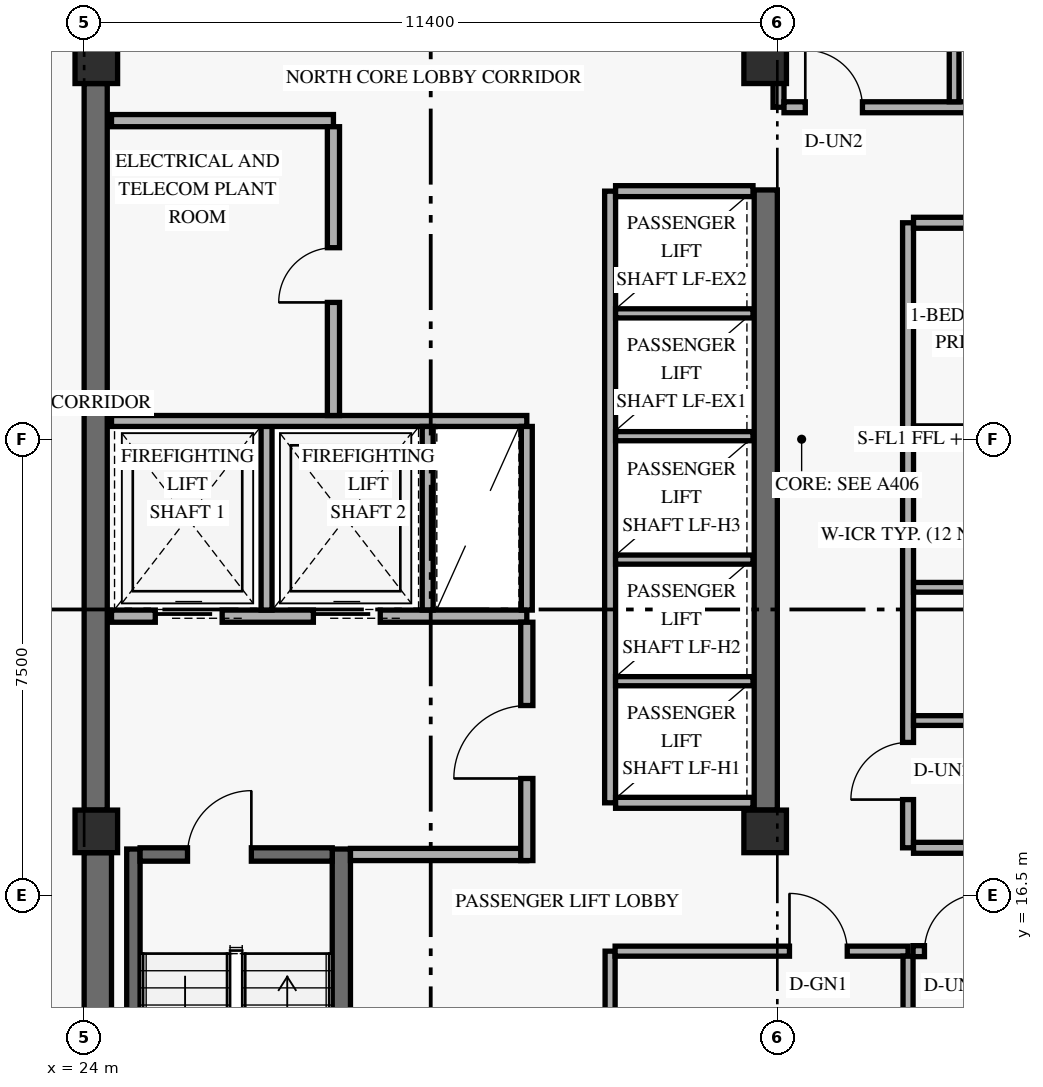
"""IFC4 building model, lengths in metres.
Left out: names, types, materials, properties, quantities, classifications, styles, units other than length and angle.
Written with IfcOpenShell. Run it as: python <this file> out.ifc"""

import sys

from ifc_helpers import new_model, si_unit, direction, frame, frame_2d, origin, origin_2d, place, context, subcontext, project, spatial, rectangle, extrude, element, fill, save


model = new_model("IFC4")
c1 = context("Model", 3, precision=1e-05, world=origin(), true_north=direction((0.0, 1.0)))
c2 = subcontext(c1, "Body", "Model", "MODEL_VIEW")
j1 = project(units=[si_unit("LENGTHUNIT", "METRE"), si_unit("PLANEANGLEUNIT", "RADIAN")], contexts=[c1])
p1 = place(None, origin())
s1 = spatial("IfcSite", under=j1, at=p1, CompositionType="ELEMENT")
p2 = place(p1, origin())
s2 = spatial("IfcBuilding", under=s1, at=p2, CompositionType="ELEMENT")
p3 = place(p2, frame((0.0, 0.0, 155.4)))
s3 = spatial("IfcBuildingStorey", under=s2, at=p3, CompositionType="ELEMENT", Elevation=155.4)
p4 = place(p3, frame((24.225, 9.6, 0.0), z_axis=(0.0, 0.0, 1.0), x_axis=(0.0, 1.0, 0.0)))
e1 = element("IfcWall", 1, at=p4, inside=s3, PredefinedType="SHEAR", context=c2, shape_type="SweptSolid", body=[
    extrude(rectangle(XDim=7.6, YDim=0.45, at=frame_2d((3.8, 0.0))), origin(), (0.0, 0.0, 1.0), 2.748),
])
p5 = place(p3, frame((24.19, 17.9, 0.0), z_axis=(0.0, 0.0, 1.0), x_axis=(0.0, 1.0, 0.0)))
e2 = element("IfcWall", 2, at=p5, inside=s3, PredefinedType="SHEAR", context=c2, shape_type="SweptSolid", body=[
    extrude(rectangle(XDim=11.95, YDim=0.38, at=frame_2d((5.975, 0.0))), origin(), (0.0, 0.0, 1.0), 2.748),
])
p6 = place(p3, frame((35.21, 17.9, 0.0), z_axis=(0.0, 0.0, 1.0), x_axis=(0.0, 1.0, 0.0)))
e3 = element("IfcWall", 3, at=p6, inside=s3, PredefinedType="SHEAR", context=c2, shape_type="SweptSolid", body=[
    extrude(rectangle(XDim=10.2, YDim=0.38, at=frame_2d((5.1, 0.0))), origin(), (0.0, 0.0, 1.0), 2.748),
])
p7 = place(p3, frame((24.81, 9.5, 0.0), z_axis=(0.0, 0.0, 1.0), x_axis=(0.0, 1.0, 0.0)))
e4 = element("IfcWall", 4, at=p7, inside=s3, PredefinedType="SHEAR", context=c2, shape_type="SweptSolid", body=[
    extrude(rectangle(XDim=7.76, YDim=0.22, at=frame_2d((3.88, 0.0))), origin(), (0.0, 0.0, 1.0), 3.36),
])
p8 = place(p3, frame((28.23, 9.5, 0.0), z_axis=(0.0, 0.0, 1.0), x_axis=(0.0, 1.0, 0.0)))
e5 = element("IfcWall", 5, at=p8, inside=s3, PredefinedType="SHEAR", context=c2, shape_type="SweptSolid", body=[
    extrude(rectangle(XDim=7.76, YDim=0.3, at=frame_2d((3.88, 0.0))), origin(), (0.0, 0.0, 1.0), 3.36),
])
p9 = place(p3, frame((24.92, 17.17, 0.0), z_axis=(0.0, 0.0, 1.0), x_axis=(1.0, 0.0, 0.0)))
e6 = element("IfcWall", 6, at=p9, inside=s3, PredefinedType="SHEAR", context=c2, shape_type="SweptSolid", body=[
    extrude(rectangle(XDim=3.16, YDim=0.22, at=frame_2d((1.58, 0.0))), origin(), (0.0, 0.0, 1.0), 3.36),
])
p10 = place(p9, frame((0.78, 0.0, 0.0)))
e7 = element("IfcOpeningElement", 7, at=p10, cuts=e6, PredefinedType="OPENING", context=c2, shape_type="SweptSolid", body=[
    extrude(rectangle(XDim=1.05, YDim=2.15, at=frame_2d((0.525, 1.075))), frame((0.0, 0.12, 0.0), z_axis=(0.0, -1.0, 0.0), x_axis=(1.0, 0.0, 0.0)), (0.0, 0.0, 1.0), 0.24),
])
for number, where, z_axis, x_axis in (
    (8, (24.2, 17.55, 0.0), (0.0, 0.0, 1.0), (1.0, 0.0, 0.0)),
    (9, (24.2, 30.2, 0.0), (0.0, 0.0, 1.0), (1.0, 0.0, 0.0)),
    (10, (35.2, 17.55, 0.0), (0.0, 0.0, 1.0), (1.0, 0.0, 0.0)),
    (11, (35.2, 30.2, 0.0), (0.0, 0.0, 1.0), (1.0, 0.0, 0.0)),
):
    element("IfcColumn", number, at=place(p3, frame(where, z_axis=z_axis, x_axis=x_axis)), inside=s3, PredefinedType="COLUMN", context=c2, shape_type="SweptSolid", body=[
        extrude(rectangle(XDim=0.7, YDim=0.7, at=origin_2d()), origin(), (0.0, 0.0, 1.0), 3.6),
    ])
p11 = place(p3, frame((24.45, 21.09, 0.0), z_axis=(0.0, 0.0, 1.0), x_axis=(1.0, 0.0, 0.0)))
e12 = element("IfcWall", 12, at=p11, inside=s3, PredefinedType="STANDARD", context=c2, shape_type="SweptSolid", body=[
    extrude(rectangle(XDim=6.83, YDim=0.2, at=frame_2d((3.415, 0.0))), origin(), (0.0, 0.0, 1.0), 3.36),
])
p12 = place(p11, frame((0.72, 0.0, 0.0)))
e13 = element("IfcOpeningElement", 13, at=p12, cuts=e12, PredefinedType="OPENING", context=c2, shape_type="SweptSolid", body=[
    extrude(rectangle(XDim=1.1, YDim=2.2, at=frame_2d((0.55, 1.1))), frame((0.0, 0.11, 0.0), z_axis=(0.0, -1.0, 0.0), x_axis=(1.0, 0.0, 0.0)), (0.0, 0.0, 1.0), 0.22),
])
p13 = place(p11, frame((3.32, 0.0, 0.0)))
e14 = element("IfcOpeningElement", 14, at=p13, cuts=e12, PredefinedType="OPENING", context=c2, shape_type="SweptSolid", body=[
    extrude(rectangle(XDim=1.1, YDim=2.2, at=frame_2d((0.55, 1.1))), frame((0.0, 0.11, 0.0), z_axis=(0.0, -1.0, 0.0), x_axis=(1.0, 0.0, 0.0)), (0.0, 0.0, 1.0), 0.22),
])
p14 = place(p3, frame((28.38, 17.17, 0.0), z_axis=(0.0, 0.0, 1.0), x_axis=(1.0, 0.0, 0.0)))
e15 = element("IfcWall", 15, at=p14, inside=s3, PredefinedType="STANDARD", context=c2, shape_type="SweptSolid", body=[
    extrude(rectangle(XDim=2.9, YDim=0.2, at=frame_2d((1.45, 0.0))), origin(), (0.0, 0.0, 1.0), 3.36),
])
p15 = place(p3, frame((31.28, 17.07, 0.0), z_axis=(0.0, 0.0, 1.0), x_axis=(0.0, 1.0, 0.0)))
e16 = element("IfcWall", 16, at=p15, inside=s3, PredefinedType="STANDARD", context=c2, shape_type="SweptSolid", body=[
    extrude(rectangle(XDim=3.92, YDim=0.2, at=frame_2d((1.96, 0.0))), origin(), (0.0, 0.0, 1.0), 2.73),
])
p16 = place(p15, frame((1.35, 0.0, 0.0)))
e17 = element("IfcOpeningElement", 17, at=p16, cuts=e16, PredefinedType="OPENING", context=c2, shape_type="SweptSolid", body=[
    extrude(rectangle(XDim=1.2, YDim=2.15, at=frame_2d((0.6, 1.075))), frame((0.0, 0.11, 0.0), z_axis=(0.0, -1.0, 0.0), x_axis=(1.0, 0.0, 0.0)), (0.0, 0.0, 1.0), 0.22),
])
p17 = place(p3, frame((27.0, 21.19, 0.0), z_axis=(0.0, 0.0, 1.0), x_axis=(0.0, 1.0, 0.0)))
e18 = element("IfcWall", 18, at=p17, inside=s3, PredefinedType="STANDARD", context=c2, shape_type="SweptSolid", body=[
    extrude(rectangle(XDim=3.11, YDim=0.18, at=frame_2d((1.555, 0.0))), origin(), (0.0, 0.0, 1.0), 3.36),
])
p18 = place(p3, frame((24.45, 24.3, 0.0), z_axis=(0.0, 0.0, 1.0), x_axis=(1.0, 0.0, 0.0)))
e19 = element("IfcWall", 19, at=p18, inside=s3, PredefinedType="STANDARD", context=c2, shape_type="SweptSolid", body=[
    extrude(rectangle(XDim=6.83, YDim=0.18, at=frame_2d((3.415, 0.0))), origin(), (0.0, 0.0, 1.0), 3.36),
])
for number, where, z_axis, x_axis in (
    (20, (29.65, 21.19, 0.0), (0.0, 0.0, 1.0), (0.0, 1.0, 0.0)),
    (21, (31.28, 21.19, 0.0), (0.0, 0.0, 1.0), (0.0, 1.0, 0.0)),
):
    element("IfcWall", number, at=place(p3, frame(where, z_axis=z_axis, x_axis=x_axis)), inside=s3, PredefinedType="STANDARD", context=c2, shape_type="SweptSolid", body=[
        extrude(rectangle(XDim=3.02, YDim=0.18, at=frame_2d((1.51, 0.0))), origin(), (0.0, 0.0, 1.0), 3.36),
    ])
p19 = place(p3, frame((24.45, 29.24, 0.0), z_axis=(0.0, 0.0, 1.0), x_axis=(1.0, 0.0, 0.0)))
e22 = element("IfcWall", 22, at=p19, inside=s3, PredefinedType="STANDARD", context=c2, shape_type="SweptSolid", body=[
    extrude(rectangle(XDim=3.65, YDim=0.2, at=frame_2d((1.825, 0.0))), origin(), (0.0, 0.0, 1.0), 3.36),
])
p20 = place(p3, frame((28.1, 24.39, 0.0), z_axis=(0.0, 0.0, 1.0), x_axis=(0.0, 1.0, 0.0)))
e23 = element("IfcWall", 23, at=p20, inside=s3, PredefinedType="STANDARD", context=c2, shape_type="SweptSolid", body=[
    extrude(rectangle(XDim=4.75, YDim=0.2, at=frame_2d((2.375, 0.0))), origin(), (0.0, 0.0, 1.0), 3.36),
])
p21 = place(p20, frame((1.86, 0.0, 0.0)))
e24 = element("IfcOpeningElement", 24, at=p21, cuts=e23, PredefinedType="OPENING", context=c2, shape_type="SweptSolid", body=[
    extrude(rectangle(XDim=0.9, YDim=2.1, at=frame_2d((0.45, 1.05))), frame((0.0, 0.11, 0.0), z_axis=(0.0, -1.0, 0.0), x_axis=(1.0, 0.0, 0.0)), (0.0, 0.0, 1.0), 0.22),
])
p22 = place(p3, frame((32.65, 18.02, 0.0), z_axis=(0.0, 0.0, 1.0), x_axis=(0.0, 1.0, 0.0)))
e25 = element("IfcWall", 25, at=p22, inside=s3, PredefinedType="STANDARD", context=c2, shape_type="SweptSolid", body=[
    extrude(rectangle(XDim=10.06, YDim=0.18, at=frame_2d((5.03, 0.0))), origin(), (0.0, 0.0, 1.0), 3.36),
])
for number, where, z_axis, x_axis in (
    (26, (32.74, 18.02, 0.0), (0.0, 0.0, 1.0), (1.0, 0.0, 0.0)),
    (27, (32.74, 28.08, 0.0), (0.0, 0.0, 1.0), (1.0, 0.0, 0.0)),
):
    element("IfcWall", number, at=place(p3, frame(where, z_axis=z_axis, x_axis=x_axis)), inside=s3, PredefinedType="STANDARD", context=c2, shape_type="SweptSolid", body=[
        extrude(rectangle(XDim=2.26, YDim=0.18, at=frame_2d((1.13, 0.0))), origin(), (0.0, 0.0, 1.0), 3.36),
    ])
for number, where, z_axis, x_axis in (
    (28, (32.74, 20.02, 0.0), (0.0, 0.0, 1.0), (1.0, 0.0, 0.0)),
    (29, (32.74, 22.02, 0.0), (0.0, 0.0, 1.0), (1.0, 0.0, 0.0)),
    (30, (32.74, 24.05, 0.0), (0.0, 0.0, 1.0), (1.0, 0.0, 0.0)),
    (31, (32.74, 26.07, 0.0), (0.0, 0.0, 1.0), (1.0, 0.0, 0.0)),
):
    element("IfcWall", number, at=place(p3, frame(where, z_axis=z_axis, x_axis=x_axis)), inside=s3, PredefinedType="STANDARD", context=c2, shape_type="SweptSolid", body=[
        extrude(rectangle(XDim=2.26, YDim=0.15, at=frame_2d((1.13, 0.0))), origin(), (0.0, 0.0, 1.0), 3.36),
    ])
p23 = place(p3, frame((32.65, 9.5, 0.0), z_axis=(0.0, 0.0, 1.0), x_axis=(0.0, 1.0, 0.0)))
e32 = element("IfcWall", 32, at=p23, inside=s3, PredefinedType="PARTITIONING", context=c2, shape_type="SweptSolid", body=[
    extrude(rectangle(XDim=6.08, YDim=0.165, at=frame_2d((3.04, 0.0))), origin(), (0.0, 0.0, 1.0), 3.36),
])
p24 = place(p3, frame((32.732, 15.58, 0.0), z_axis=(0.0, 0.0, 1.0), x_axis=(1.0, 0.0, 0.0)))
e33 = element("IfcWall", 33, at=p24, inside=s3, PredefinedType="PARTITIONING", context=c2, shape_type="SweptSolid", body=[
    extrude(rectangle(XDim=4.818, YDim=0.165, at=frame_2d((2.409, 0.0))), origin(), (0.0, 0.0, 1.0), 2.73),
])
p25 = place(p24, frame((2.867, 0.0, 0.0)))
e34 = element("IfcOpeningElement", 34, at=p25, cuts=e33, PredefinedType="OPENING", context=c2, shape_type="SweptSolid", body=[
    extrude(rectangle(XDim=0.95, YDim=2.15, at=frame_2d((0.475, 1.075))), frame((0.0, 0.093, 0.0), z_axis=(0.0, -1.0, 0.0), x_axis=(1.0, 0.0, 0.0)), (0.0, 0.0, 1.0), 0.185),
])
p26 = place(p3, frame((37.55, 9.25, 0.0), z_axis=(0.0, 0.0, 1.0), x_axis=(0.0, 1.0, 0.0)))
e35 = element("IfcWall", 35, at=p26, inside=s3, PredefinedType="PARTITIONING", context=c2, shape_type="SweptSolid", body=[
    extrude(rectangle(XDim=6.248, YDim=0.165, at=frame_2d((3.124, 0.0))), origin(), (0.0, 0.0, 1.0), 2.73),
])
p27 = place(p3, frame((37.55, 17.28, 0.0), z_axis=(0.0, 0.0, 1.0), x_axis=(0.0, 1.0, 0.0)))
e36 = element("IfcWall", 36, at=p27, inside=s3, PredefinedType="STANDARD", context=c2, shape_type="SweptSolid", body=[
    extrude(rectangle(XDim=10.28, YDim=0.18, at=frame_2d((5.14, 0.0))), origin(), (0.0, 0.0, 1.0), 2.73),
])
p28 = place(p27, frame((0.793, 0.0, 0.0)))
e37 = element("IfcOpeningElement", 37, at=p28, cuts=e36, PredefinedType="OPENING", context=c2, shape_type="SweptSolid", body=[
    extrude(rectangle(XDim=0.94, YDim=2.15, at=frame_2d((0.47, 1.075))), frame((0.0, 0.1, 0.0), z_axis=(0.0, -1.0, 0.0), x_axis=(1.0, 0.0, 0.0)), (0.0, 0.0, 1.0), 0.2),
])
p29 = place(p3, frame((37.633, 15.58, 0.0), z_axis=(0.0, 0.0, 1.0), x_axis=(1.0, 0.0, 0.0)))
e38 = element("IfcWall", 38, at=p29, inside=s3, PredefinedType="STANDARD", context=c2, shape_type="SweptSolid", body=[
    extrude(rectangle(XDim=12.167, YDim=0.18, at=frame_2d((6.084, 0.0))), origin(), (0.0, 0.0, 1.0), 2.73),
])
p30 = place(p29, frame((0.188, 0.0, 0.0)))
e39 = element("IfcOpeningElement", 39, at=p30, cuts=e38, PredefinedType="OPENING", context=c2, shape_type="SweptSolid", body=[
    extrude(rectangle(XDim=0.94, YDim=2.15, at=frame_2d((0.47, 1.075))), frame((0.0, 0.1, 0.0), z_axis=(0.0, -1.0, 0.0), x_axis=(1.0, 0.0, 0.0)), (0.0, 0.0, 1.0), 0.2),
])
p31 = place(p3, frame((37.64, 17.28, 0.0), z_axis=(0.0, 0.0, 1.0), x_axis=(1.0, 0.0, 0.0)))
e40 = element("IfcWall", 40, at=p31, inside=s3, PredefinedType="STANDARD", context=c2, shape_type="SweptSolid", body=[
    extrude(rectangle(XDim=12.16, YDim=0.18, at=frame_2d((6.08, 0.0))), origin(), (0.0, 0.0, 1.0), 2.73),
])
p32 = place(p31, frame((6.475, 0.0, 0.0)))
e41 = element("IfcOpeningElement", 41, at=p32, cuts=e40, PredefinedType="OPENING", context=c2, shape_type="SweptSolid", body=[
    extrude(rectangle(XDim=0.94, YDim=2.15, at=frame_2d((0.47, 1.075))), frame((0.0, 0.1, 0.0), z_axis=(0.0, -1.0, 0.0), x_axis=(1.0, 0.0, 0.0)), (0.0, 0.0, 1.0), 0.2),
])
p33 = place(p3, frame((37.64, 27.56, 0.0), z_axis=(0.0, 0.0, 1.0), x_axis=(1.0, 0.0, 0.0)))
e42 = element("IfcWall", 42, at=p33, inside=s3, PredefinedType="STANDARD", context=c2, shape_type="SweptSolid", body=[
    extrude(rectangle(XDim=12.16, YDim=0.18, at=frame_2d((6.08, 0.0))), origin(), (0.0, 0.0, 1.0), 2.73),
])
p34 = place(p3, frame((35.42, 29.46, 0.0), z_axis=(0.0, 0.0, 1.0), x_axis=(0.0, 1.0, 0.0)))
e43 = element("IfcWall", 43, at=p34, inside=s3, PredefinedType="STANDARD", context=c2, shape_type="SweptSolid", body=[
    extrude(rectangle(XDim=1.89, YDim=0.18, at=frame_2d((0.945, 0.0))), origin(), (0.0, 0.0, 1.0), 2.73),
])
p35 = place(p3, frame((35.51, 29.46, 0.0), z_axis=(0.0, 0.0, 1.0), x_axis=(1.0, 0.0, 0.0)))
e44 = element("IfcWall", 44, at=p35, inside=s3, PredefinedType="STANDARD", context=c2, shape_type="SweptSolid", body=[
    extrude(rectangle(XDim=14.29, YDim=0.18, at=frame_2d((7.145, 0.0))), origin(), (0.0, 0.0, 1.0), 2.73),
])
p36 = place(p35, frame((0.35, 0.0, 0.0)))
e45 = element("IfcOpeningElement", 45, at=p36, cuts=e44, PredefinedType="OPENING", context=c2, shape_type="SweptSolid", body=[
    extrude(rectangle(XDim=0.94, YDim=2.15, at=frame_2d((0.47, 1.075))), frame((0.0, 0.1, 0.0), z_axis=(0.0, -1.0, 0.0), x_axis=(1.0, 0.0, 0.0)), (0.0, 0.0, 1.0), 0.2),
])
p37 = place(p35, frame((7.828, 0.0, 0.0)))
e46 = element("IfcOpeningElement", 46, at=p37, cuts=e44, PredefinedType="OPENING", context=c2, shape_type="SweptSolid", body=[
    extrude(rectangle(XDim=0.94, YDim=2.15, at=frame_2d((0.47, 1.075))), frame((0.0, 0.1, 0.0), z_axis=(0.0, -1.0, 0.0), x_axis=(1.0, 0.0, 0.0)), (0.0, 0.0, 1.0), 0.2),
])
p38 = place(p3, frame((38.308, 29.55, 0.0), z_axis=(0.0, 0.0, 1.0), x_axis=(0.0, 1.0, 0.0)))
e47 = element("IfcWall", 47, at=p38, inside=s3, PredefinedType="PLUMBINGWALL", context=c2, shape_type="SweptSolid", body=[
    extrude(rectangle(XDim=2.43, YDim=0.16, at=frame_2d((1.215, 0.0))), origin(), (0.0, 0.0, 1.0), 2.73),
])
p39 = place(p3, frame((37.64, 24.137, 0.0), z_axis=(0.0, 0.0, 1.0), x_axis=(1.0, 0.0, 0.0)))
e48 = element("IfcWall", 48, at=p39, inside=s3, PredefinedType="PARTITIONING", context=c2, shape_type="SweptSolid", body=[
    extrude(rectangle(XDim=6.425, YDim=0.165, at=frame_2d((3.212, 0.0))), origin(), (0.0, 0.0, 1.0), 3.36),
])
p40 = place(p39, frame((4.004, 0.0, 0.0)))
e49 = element("IfcOpeningElement", 49, at=p40, cuts=e48, PredefinedType="OPENING", context=c2, shape_type="SweptSolid", body=[
    extrude(rectangle(XDim=0.9, YDim=2.14, at=frame_2d((0.45, 1.07))), frame((0.0, 0.093, 0.0), z_axis=(0.0, -1.0, 0.0), x_axis=(1.0, 0.0, 0.0)), (0.0, 0.0, 1.0), 0.185),
])
p41 = place(p3, frame((37.64, 19.373, 0.0), z_axis=(0.0, 0.0, 1.0), x_axis=(1.0, 0.0, 0.0)))
e50 = element("IfcWall", 50, at=p41, inside=s3, PredefinedType="PLUMBINGWALL", context=c2, shape_type="SweptSolid", body=[
    extrude(rectangle(XDim=2.864, YDim=0.16, at=frame_2d((1.432, 0.0))), origin(), (0.0, 0.0, 1.0), 3.36),
])
p42 = place(p3, frame((37.64, 21.564, 0.0), z_axis=(0.0, 0.0, 1.0), x_axis=(1.0, 0.0, 0.0)))
e51 = element("IfcWall", 51, at=p42, inside=s3, PredefinedType="PLUMBINGWALL", context=c2, shape_type="SweptSolid", body=[
    extrude(rectangle(XDim=2.704, YDim=0.16, at=frame_2d((1.352, 0.0))), origin(), (0.0, 0.0, 1.0), 3.36),
])
p43 = place(p10, frame((1.05, 0.0, 0.0), z_axis=(0.0, 0.0, 1.0), x_axis=(-1.0, 0.0, 0.0)))
e52 = element("IfcDoor", 52, at=p43, inside=s3, OperationType="SINGLE_SWING_LEFT", PredefinedType="DOOR", context=c2, shape_type="SweptSolid", body=[
    extrude(rectangle(XDim=1.05, YDim=2.15, at=frame_2d((0.525, 1.075))), frame((0.0, 0.025, 0.0), z_axis=(0.0, -1.0, 0.0), x_axis=(1.0, 0.0, 0.0)), (0.0, 0.0, 1.0), 0.05),
])
fill(e7, e52)
p44 = place(p12, origin())
e53 = element("IfcDoor", 53, at=p44, inside=s3, OperationType="SLIDING_TO_LEFT", PredefinedType="DOOR", context=c2, shape_type="SweptSolid", body=[
    extrude(rectangle(XDim=1.1, YDim=2.2, at=frame_2d((0.55, 1.1))), frame((0.0, 0.025, 0.0), z_axis=(0.0, -1.0, 0.0), x_axis=(1.0, 0.0, 0.0)), (0.0, 0.0, 1.0), 0.05),
])
fill(e13, e53)
p45 = place(p13, origin())
e54 = element("IfcDoor", 54, at=p45, inside=s3, OperationType="SLIDING_TO_LEFT", PredefinedType="DOOR", context=c2, shape_type="SweptSolid", body=[
    extrude(rectangle(XDim=1.1, YDim=2.2, at=frame_2d((0.55, 1.1))), frame((0.0, 0.025, 0.0), z_axis=(0.0, -1.0, 0.0), x_axis=(1.0, 0.0, 0.0)), (0.0, 0.0, 1.0), 0.05),
])
fill(e14, e54)
p46 = place(p16, origin())
e55 = element("IfcDoor", 55, at=p46, inside=s3, OperationType="SINGLE_SWING_LEFT", PredefinedType="DOOR", context=c2, shape_type="SweptSolid", body=[
    extrude(rectangle(XDim=1.2, YDim=2.15, at=frame_2d((0.6, 1.075))), frame((0.0, 0.025, 0.0), z_axis=(0.0, -1.0, 0.0), x_axis=(1.0, 0.0, 0.0)), (0.0, 0.0, 1.0), 0.05),
])
fill(e17, e55)
p47 = place(p21, origin())
e56 = element("IfcDoor", 56, at=p47, inside=s3, OperationType="SINGLE_SWING_LEFT", PredefinedType="DOOR", context=c2, shape_type="SweptSolid", body=[
    extrude(rectangle(XDim=0.9, YDim=2.1, at=frame_2d((0.45, 1.05))), frame((0.0, 0.025, 0.0), z_axis=(0.0, -1.0, 0.0), x_axis=(1.0, 0.0, 0.0)), (0.0, 0.0, 1.0), 0.05),
])
fill(e24, e56)
p48 = place(p25, origin())
e57 = element("IfcDoor", 57, at=p48, inside=s3, OperationType="SINGLE_SWING_LEFT", PredefinedType="DOOR", context=c2, shape_type="SweptSolid", body=[
    extrude(rectangle(XDim=0.95, YDim=2.15, at=frame_2d((0.475, 1.075))), frame((0.0, 0.025, 0.0), z_axis=(0.0, -1.0, 0.0), x_axis=(1.0, 0.0, 0.0)), (0.0, 0.0, 1.0), 0.05),
])
fill(e34, e57)
p49 = place(p30, origin())
e58 = element("IfcDoor", 58, at=p49, inside=s3, OperationType="SINGLE_SWING_RIGHT", PredefinedType="DOOR", context=c2, shape_type="SweptSolid", body=[
    extrude(rectangle(XDim=0.94, YDim=2.15, at=frame_2d((0.47, 1.075))), frame((0.0, 0.025, 0.0), z_axis=(0.0, -1.0, 0.0), x_axis=(1.0, 0.0, 0.0)), (0.0, 0.0, 1.0), 0.05),
])
fill(e39, e58)
p50 = place(p36, origin())
e59 = element("IfcDoor", 59, at=p50, inside=s3, OperationType="SINGLE_SWING_LEFT", PredefinedType="DOOR", context=c2, shape_type="SweptSolid", body=[
    extrude(rectangle(XDim=0.94, YDim=2.15, at=frame_2d((0.47, 1.075))), frame((0.0, 0.025, 0.0), z_axis=(0.0, -1.0, 0.0), x_axis=(1.0, 0.0, 0.0)), (0.0, 0.0, 1.0), 0.05),
])
fill(e45, e59)
p51 = place(p28, origin())
e60 = element("IfcDoor", 60, at=p51, inside=s3, OperationType="SINGLE_SWING_LEFT", PredefinedType="DOOR", context=c2, shape_type="SweptSolid", body=[
    extrude(rectangle(XDim=0.94, YDim=2.15, at=frame_2d((0.47, 1.075))), frame((0.0, 0.025, 0.0), z_axis=(0.0, -1.0, 0.0), x_axis=(1.0, 0.0, 0.0)), (0.0, 0.0, 1.0), 0.05),
])
fill(e37, e60)
save(model, sys.argv[1])
